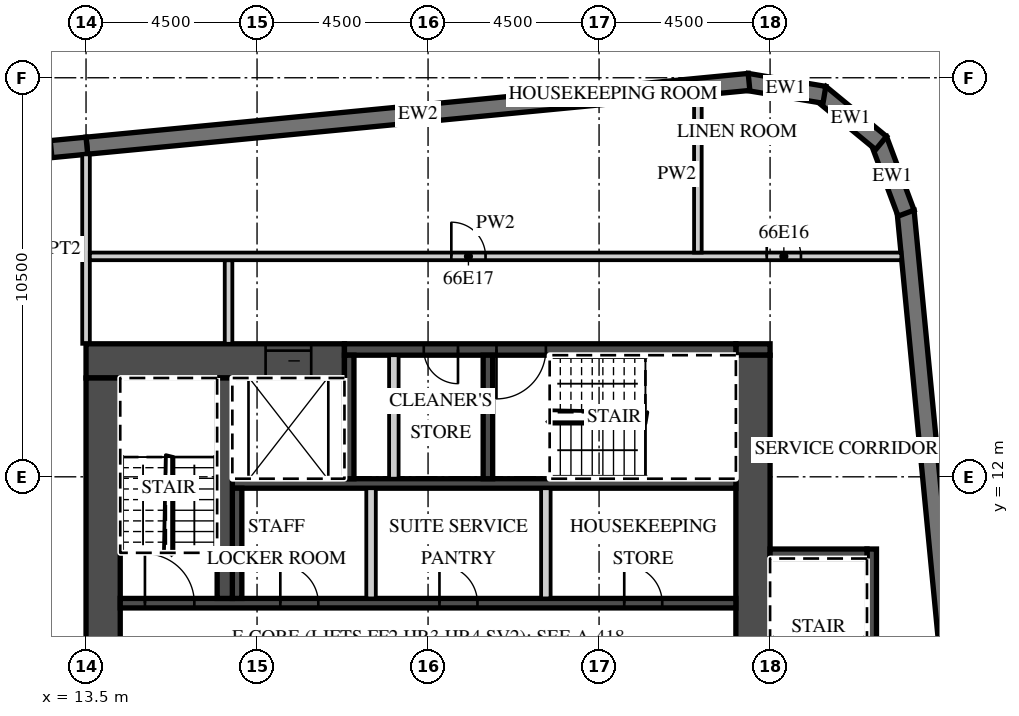
"""IFC4 building model, lengths in metres.
Left out: names, types, materials, properties, quantities, classifications, styles, units other than length and angle.
Written with IfcOpenShell. Run it as: python <this file> out.ifc"""

import sys

from ifc_helpers import new_model, si_unit, direction, frame, frame_2d, origin, place, context, subcontext, project, spatial, polyline, rectangle, outline, extrude, element, fill, save


model = new_model("IFC4")
c1 = context("Model", 3, precision=1e-05, world=origin(), true_north=direction((0.0, 1.0)))
c2 = subcontext(c1, "Body", "Model", "MODEL_VIEW")
j1 = project(units=[si_unit("LENGTHUNIT", "METRE"), si_unit("PLANEANGLEUNIT", "RADIAN")], contexts=[c1])
p1 = place(None, origin())
s1 = spatial("IfcSite", under=j1, at=p1, CompositionType="ELEMENT")
p2 = place(p1, origin())
s2 = spatial("IfcBuilding", under=s1, at=p2, CompositionType="ELEMENT")
p3 = place(p2, frame((0.0, 0.0, 268.5)))
s3 = spatial("IfcBuildingStorey", under=s2, at=p3, CompositionType="ELEMENT", Elevation=268.5)
p4 = place(p3, frame((38.132, -12.858, 0.0), z_axis=(0.0, 0.0, 1.0), x_axis=(-0.095847749461, 0.995396006082, 0.0)))
e1 = element("IfcWall", 1, at=p4, inside=s3, PredefinedType="SOLIDWALL", context=c2, shape_type="SweptSolid", body=[
    extrude(rectangle(XDim=32.0, YDim=0.45, at=frame_2d((16.0, 0.0))), origin(), (0.0, 0.0, 1.0), 3.02),
])
p5 = place(p3, frame((35.078, 18.938, 0.0), z_axis=(0.0, 0.0, 1.0), x_axis=(-0.350192909346, 0.936677599948, 0.0)))
e2 = element("IfcWall", 2, at=p5, inside=s3, PredefinedType="SOLIDWALL", context=c2, shape_type="SweptSolid", body=[
    extrude(outline(polyline([(0.0, -0.225), (2.071, -0.225), (1.95, 0.225), (0.121, 0.225), (0.0, -0.225)])), origin(), (0.0, 0.0, 1.0), 3.02),
])
p6 = place(p3, frame((34.421, 20.782, 0.0), z_axis=(0.0, 0.0, 1.0), x_axis=(-0.771593176315, 0.636116318187, 0.0)))
e3 = element("IfcWall", 3, at=p6, inside=s3, PredefinedType="SOLIDWALL", context=c2, shape_type="SweptSolid", body=[
    extrude(outline(polyline([(0.0, -0.225), (2.071, -0.225), (1.95, 0.225), (0.12, 0.225), (0.0, -0.225)])), origin(), (0.0, 0.0, 1.0), 3.02),
])
p7 = place(p3, frame((32.929, 22.051, 0.0), z_axis=(0.0, 0.0, 1.0), x_axis=(-0.986298144721, 0.164972633245, 0.0)))
e4 = element("IfcWall", 4, at=p7, inside=s3, PredefinedType="SOLIDWALL", context=c2, shape_type="SweptSolid", body=[
    extrude(outline(polyline([(0.0, -0.225), (2.07, -0.225), (1.95, 0.225), (0.121, 0.225), (0.0, -0.225)])), origin(), (0.0, 0.0, 1.0), 3.02),
])
p8 = place(p3, frame((30.946, 22.391, 0.0), z_axis=(0.0, 0.0, 1.0), x_axis=(-0.995396397117, -0.095843688398, 0.0)))
e5 = element("IfcWall", 5, at=p8, inside=s3, PredefinedType="SOLIDWALL", context=c2, shape_type="SweptSolid", body=[
    extrude(rectangle(XDim=17.505, YDim=0.45, at=frame_2d((8.752, 0.0))), origin(), (0.0, 0.0, 1.0), 3.02),
])
p9 = place(p3, frame((13.521, 20.713, 0.0), z_axis=(0.0, 0.0, 1.0), x_axis=(-0.995396277313, -0.095844932638, 0.0)))
e6 = element("IfcWall", 6, at=p9, inside=s3, PredefinedType="SOLIDWALL", context=c2, shape_type="SweptSolid", body=[
    extrude(rectangle(XDim=51.495, YDim=0.45, at=frame_2d((25.748, 0.0))), origin(), (0.0, 0.0, 1.0), 3.02),
])
p10 = place(p9, frame((0.91, 0.0, 0.45)))
e7 = element("IfcOpeningElement", 7, at=p10, cuts=e6, PredefinedType="OPENING", context=c2, shape_type="SweptSolid", body=[
    extrude(rectangle(XDim=2.7, YDim=2.25, at=frame_2d((1.35, 1.125))), frame((0.0, 0.235, 0.0), z_axis=(0.0, -1.0, 0.0), x_axis=(1.0, 0.0, 0.0)), (0.0, 0.0, 1.0), 0.47),
])
p11 = place(p9, frame((5.431, 0.0, 0.45)))
e8 = element("IfcOpeningElement", 8, at=p11, cuts=e6, PredefinedType="OPENING", context=c2, shape_type="SweptSolid", body=[
    extrude(rectangle(XDim=2.7, YDim=2.25, at=frame_2d((1.35, 1.125))), frame((0.0, 0.235, 0.0), z_axis=(0.0, -1.0, 0.0), x_axis=(1.0, 0.0, 0.0)), (0.0, 0.0, 1.0), 0.47),
])
p12 = place(p9, frame((9.952, 0.0, 0.45)))
e9 = element("IfcOpeningElement", 9, at=p12, cuts=e6, PredefinedType="OPENING", context=c2, shape_type="SweptSolid", body=[
    extrude(rectangle(XDim=2.7, YDim=2.25, at=frame_2d((1.35, 1.125))), frame((0.0, 0.235, 0.0), z_axis=(0.0, -1.0, 0.0), x_axis=(1.0, 0.0, 0.0)), (0.0, 0.0, 1.0), 0.47),
])
p13 = place(p9, frame((14.473, 0.0, 0.45)))
e10 = element("IfcOpeningElement", 10, at=p13, cuts=e6, PredefinedType="OPENING", context=c2, shape_type="SweptSolid", body=[
    extrude(rectangle(XDim=2.7, YDim=2.25, at=frame_2d((1.35, 1.125))), frame((0.0, 0.235, 0.0), z_axis=(0.0, -1.0, 0.0), x_axis=(1.0, 0.0, 0.0)), (0.0, 0.0, 1.0), 0.47),
])
p14 = place(p9, frame((18.994, 0.0, 0.45)))
e11 = element("IfcOpeningElement", 11, at=p14, cuts=e6, PredefinedType="OPENING", context=c2, shape_type="SweptSolid", body=[
    extrude(rectangle(XDim=2.7, YDim=2.25, at=frame_2d((1.35, 1.125))), frame((0.0, 0.235, 0.0), z_axis=(0.0, -1.0, 0.0), x_axis=(1.0, 0.0, 0.0)), (0.0, 0.0, 1.0), 0.47),
])
p15 = place(p9, frame((23.514, 0.0, 0.45)))
e12 = element("IfcOpeningElement", 12, at=p15, cuts=e6, PredefinedType="OPENING", context=c2, shape_type="SweptSolid", body=[
    extrude(rectangle(XDim=2.7, YDim=2.25, at=frame_2d((1.35, 1.125))), frame((0.0, 0.235, 0.0), z_axis=(0.0, -1.0, 0.0), x_axis=(1.0, 0.0, 0.0)), (0.0, 0.0, 1.0), 0.47),
])
p16 = place(p9, frame((28.035, 0.0, 0.45)))
e13 = element("IfcOpeningElement", 13, at=p16, cuts=e6, PredefinedType="OPENING", context=c2, shape_type="SweptSolid", body=[
    extrude(rectangle(XDim=2.7, YDim=2.25, at=frame_2d((1.35, 1.125))), frame((0.0, 0.235, 0.0), z_axis=(0.0, -1.0, 0.0), x_axis=(1.0, 0.0, 0.0)), (0.0, 0.0, 1.0), 0.47),
])
p17 = place(p9, frame((32.556, 0.0, 0.45)))
e14 = element("IfcOpeningElement", 14, at=p17, cuts=e6, PredefinedType="OPENING", context=c2, shape_type="SweptSolid", body=[
    extrude(rectangle(XDim=2.7, YDim=2.25, at=frame_2d((1.35, 1.125))), frame((0.0, 0.235, 0.0), z_axis=(0.0, -1.0, 0.0), x_axis=(1.0, 0.0, 0.0)), (0.0, 0.0, 1.0), 0.47),
])
p18 = place(p9, frame((37.077, 0.0, 0.45)))
e15 = element("IfcOpeningElement", 15, at=p18, cuts=e6, PredefinedType="OPENING", context=c2, shape_type="SweptSolid", body=[
    extrude(rectangle(XDim=2.7, YDim=2.25, at=frame_2d((1.35, 1.125))), frame((0.0, 0.235, 0.0), z_axis=(0.0, -1.0, 0.0), x_axis=(1.0, 0.0, 0.0)), (0.0, 0.0, 1.0), 0.47),
])
p19 = place(p9, frame((41.598, 0.0, 0.45)))
e16 = element("IfcOpeningElement", 16, at=p19, cuts=e6, PredefinedType="OPENING", context=c2, shape_type="SweptSolid", body=[
    extrude(rectangle(XDim=2.7, YDim=2.25, at=frame_2d((1.35, 1.125))), frame((0.0, 0.235, 0.0), z_axis=(0.0, -1.0, 0.0), x_axis=(1.0, 0.0, 0.0)), (0.0, 0.0, 1.0), 0.47),
])
p20 = place(p9, frame((46.118, 0.0, 0.45)))
e17 = element("IfcOpeningElement", 17, at=p20, cuts=e6, PredefinedType="OPENING", context=c2, shape_type="SweptSolid", body=[
    extrude(rectangle(XDim=2.7, YDim=2.25, at=frame_2d((1.35, 1.125))), frame((0.0, 0.235, 0.0), z_axis=(0.0, -1.0, 0.0), x_axis=(1.0, 0.0, 0.0)), (0.0, 0.0, 1.0), 0.47),
])
p21 = place(p3, frame((13.5, 15.5, 0.0), z_axis=(0.0, 0.0, 1.0), x_axis=(0.0, 1.0, 0.0)))
e18 = element("IfcWall", 18, at=p21, inside=s3, PredefinedType="PARTITIONING", context=c2, shape_type="SweptSolid", body=[
    extrude(rectangle(XDim=4.985, YDim=0.2, at=frame_2d((2.493, 0.0))), origin(), (0.0, 0.0, 1.0), 3.02),
])
p22 = place(p3, frame((13.5, 15.05, 0.0), z_axis=(0.0, 0.0, 1.0), x_axis=(1.0, 0.0, 0.0)))
e19 = element("IfcWall", 19, at=p22, inside=s3, PredefinedType="SHEAR", context=c2, shape_type="SweptSolid", body=[
    extrude(rectangle(XDim=6.8, YDim=0.9, at=frame_2d((3.4, 0.0))), origin(), (0.0, 0.0, 1.0), 3.02),
])
p23 = place(p22, frame((4.725, 0.0, 0.0)))
e20 = element("IfcOpeningElement", 20, at=p23, cuts=e19, PredefinedType="OPENING", context=c2, shape_type="SweptSolid", body=[
    extrude(rectangle(XDim=1.2, YDim=2.1, at=frame_2d((0.6, 1.05))), frame((0.0, 0.46, 0.0), z_axis=(0.0, -1.0, 0.0), x_axis=(1.0, 0.0, 0.0)), (0.0, 0.0, 1.0), 0.92),
])
p24 = place(p3, frame((30.6, 15.35, 0.0), z_axis=(0.0, 0.0, 1.0), x_axis=(1.0, 0.0, 0.0)))
e21 = element("IfcWall", 21, at=p24, inside=s3, PredefinedType="SHEAR", context=c2, shape_type="SweptSolid", body=[
    extrude(rectangle(XDim=0.9, YDim=0.3, at=frame_2d((0.45, 0.0))), origin(), (0.0, 0.0, 1.0), 3.02),
])
p25 = place(p3, frame((20.3, 15.35, 0.0), z_axis=(0.0, 0.0, 1.0), x_axis=(1.0, 0.0, 0.0)))
e22 = element("IfcWall", 22, at=p25, inside=s3, PredefinedType="SHEAR", context=c2, shape_type="SweptSolid", body=[
    extrude(rectangle(XDim=10.3, YDim=0.3, at=frame_2d((5.15, 0.0))), origin(), (0.0, 0.0, 1.0), 3.02),
])
p26 = place(p25, frame((4.0, 0.0, 0.0)))
e23 = element("IfcOpeningElement", 23, at=p26, cuts=e22, PredefinedType="OPENING", context=c2, shape_type="SweptSolid", body=[
    extrude(rectangle(XDim=1.3, YDim=2.1, at=frame_2d((0.65, 1.05))), frame((0.0, 0.16, 0.0), z_axis=(0.0, -1.0, 0.0), x_axis=(1.0, 0.0, 0.0)), (0.0, 0.0, 1.0), 0.32),
])
p27 = place(p25, frame((2.087, 0.0, 0.0)))
e24 = element("IfcOpeningElement", 24, at=p27, cuts=e22, PredefinedType="OPENING", context=c2, shape_type="SweptSolid", body=[
    extrude(rectangle(XDim=0.9, YDim=2.1, at=frame_2d((0.45, 1.05))), frame((0.0, 0.16, 0.0), z_axis=(0.0, -1.0, 0.0), x_axis=(1.0, 0.0, 0.0)), (0.0, 0.0, 1.0), 0.32),
])
p28 = place(p3, frame((31.05, 2.4, 0.0), z_axis=(0.0, 0.0, 1.0), x_axis=(0.0, 1.0, 0.0)))
e25 = element("IfcWall", 25, at=p28, inside=s3, PredefinedType="SHEAR", context=c2, shape_type="SweptSolid", body=[
    extrude(rectangle(XDim=12.8, YDim=0.9, at=frame_2d((6.4, 0.0))), origin(), (0.0, 0.0, 1.0), 3.02),
])
p29 = place(p28, frame((0.2, 0.0, 0.0)))
e26 = element("IfcOpeningElement", 26, at=p29, cuts=e25, PredefinedType="OPENING", context=c2, shape_type="SweptSolid", body=[
    extrude(rectangle(XDim=1.1, YDim=2.1, at=frame_2d((0.55, 1.05))), frame((0.0, 0.46, 0.0), z_axis=(0.0, -1.0, 0.0), x_axis=(1.0, 0.0, 0.0)), (0.0, 0.0, 1.0), 0.92),
])
p30 = place(p3, frame((13.95, 2.4, 0.0), z_axis=(0.0, 0.0, 1.0), x_axis=(0.0, 1.0, 0.0)))
e27 = element("IfcWall", 27, at=p30, inside=s3, PredefinedType="SHEAR", context=c2, shape_type="SweptSolid", body=[
    extrude(rectangle(XDim=12.2, YDim=0.9, at=frame_2d((6.1, 0.0))), origin(), (0.0, 0.0, 1.0), 3.02),
])
p31 = place(p3, frame((14.4, 8.675, 0.0), z_axis=(0.0, 0.0, 1.0), x_axis=(1.0, 0.0, 0.0)))
e28 = element("IfcWall", 28, at=p31, inside=s3, PredefinedType="SHEAR", context=c2, shape_type="SweptSolid", body=[
    extrude(rectangle(XDim=16.2, YDim=0.25, at=frame_2d((8.1, 0.0))), origin(), (0.0, 0.0, 1.0), 3.02),
])
p32 = place(p31, frame((0.65, 0.0, 0.0)))
e29 = element("IfcOpeningElement", 29, at=p32, cuts=e28, PredefinedType="OPENING", context=c2, shape_type="SweptSolid", body=[
    extrude(rectangle(XDim=1.3, YDim=2.1, at=frame_2d((0.65, 1.05))), frame((0.0, 0.135, 0.0), z_axis=(0.0, -1.0, 0.0), x_axis=(1.0, 0.0, 0.0)), (0.0, 0.0, 1.0), 0.27),
])
p33 = place(p31, frame((13.262, 0.0, 0.0)))
e30 = element("IfcOpeningElement", 30, at=p33, cuts=e28, PredefinedType="OPENING", context=c2, shape_type="SweptSolid", body=[
    extrude(rectangle(XDim=1.0, YDim=2.1, at=frame_2d((0.5, 1.05))), frame((0.0, 0.135, 0.0), z_axis=(0.0, -1.0, 0.0), x_axis=(1.0, 0.0, 0.0)), (0.0, 0.0, 1.0), 0.27),
])
p34 = place(p31, frame((8.4, 0.0, 0.0)))
e31 = element("IfcOpeningElement", 31, at=p34, cuts=e28, PredefinedType="OPENING", context=c2, shape_type="SweptSolid", body=[
    extrude(rectangle(XDim=1.0, YDim=2.1, at=frame_2d((0.5, 1.05))), frame((0.0, 0.135, 0.0), z_axis=(0.0, -1.0, 0.0), x_axis=(1.0, 0.0, 0.0)), (0.0, 0.0, 1.0), 0.27),
])
p35 = place(p31, frame((4.212, 0.0, 0.0)))
e32 = element("IfcOpeningElement", 32, at=p35, cuts=e28, PredefinedType="OPENING", context=c2, shape_type="SweptSolid", body=[
    extrude(rectangle(XDim=1.0, YDim=2.1, at=frame_2d((0.5, 1.05))), frame((0.0, 0.135, 0.0), z_axis=(0.0, -1.0, 0.0), x_axis=(1.0, 0.0, 0.0)), (0.0, 0.0, 1.0), 0.27),
])
p36 = place(p3, frame((17.35, 11.825, 0.0), z_axis=(0.0, 0.0, 1.0), x_axis=(1.0, 0.0, 0.0)))
e33 = element("IfcWall", 33, at=p36, inside=s3, PredefinedType="SHEAR", context=c2, shape_type="SweptSolid", body=[
    extrude(rectangle(XDim=13.25, YDim=0.25, at=frame_2d((6.625, 0.0))), origin(), (0.0, 0.0, 1.0), 3.02),
])
p37 = place(p3, frame((17.475, 8.8, 0.0), z_axis=(0.0, 0.0, 1.0), x_axis=(0.0, 1.0, 0.0)))
e34 = element("IfcWall", 34, at=p37, inside=s3, PredefinedType="SHEAR", context=c2, shape_type="SweptSolid", body=[
    extrude(rectangle(XDim=2.9, YDim=0.25, at=frame_2d((1.45, 0.0))), origin(), (0.0, 0.0, 1.0), 3.02),
])
for number, where, z_axis, x_axis in (
    (35, (25.6, 8.8, 0.0), (0.0, 0.0, 1.0), (0.0, 1.0, 0.0)),
    (36, (21.0, 8.8, 0.0), (0.0, 0.0, 1.0), (0.0, 1.0, 0.0)),
):
    element("IfcWall", number, at=place(p3, frame(where, z_axis=z_axis, x_axis=x_axis)), inside=s3, PredefinedType="PARTITIONING", context=c2, shape_type="SweptSolid", body=[
        extrude(rectangle(XDim=2.9, YDim=0.25, at=frame_2d((1.45, 0.0))), origin(), (0.0, 0.0, 1.0), 3.02),
    ])
p38 = place(p3, frame((17.15, 8.8, 0.0), z_axis=(0.0, 0.0, 1.0), x_axis=(0.0, 1.0, 0.0)))
e37 = element("IfcWall", 37, at=p38, inside=s3, PredefinedType="SHEAR", context=c2, shape_type="SweptSolid", body=[
    extrude(rectangle(XDim=5.8, YDim=0.4, at=frame_2d((2.9, 0.0))), origin(), (0.0, 0.0, 1.0), 3.02),
])
for number, where, z_axis, x_axis in (
    (38, (20.425, 11.95, 0.0), (0.0, 0.0, 1.0), (0.0, 1.0, 0.0)),
    (39, (24.075, 11.95, 0.0), (0.0, 0.0, 1.0), (0.0, 1.0, 0.0)),
):
    element("IfcWall", number, at=place(p3, frame(where, z_axis=z_axis, x_axis=x_axis)), inside=s3, PredefinedType="SHEAR", context=c2, shape_type="SweptSolid", body=[
        extrude(rectangle(XDim=3.25, YDim=0.25, at=frame_2d((1.625, 0.0))), origin(), (0.0, 0.0, 1.0), 3.02),
    ])
p39 = place(p3, frame((21.6, 11.95, 0.0), z_axis=(0.0, 0.0, 1.0), x_axis=(0.0, 1.0, 0.0)))
e40 = element("IfcWall", 40, at=p39, inside=s3, PredefinedType="PARTITIONING", context=c2, shape_type="SweptSolid", body=[
    extrude(rectangle(XDim=3.25, YDim=0.25, at=frame_2d((1.625, 0.0))), origin(), (0.0, 0.0, 1.0), 3.02),
])
p40 = place(p3, frame((34.175, 1.75, 0.0), z_axis=(0.0, 0.0, 1.0), x_axis=(0.0, 1.0, 0.0)))
e41 = element("IfcWall", 41, at=p40, inside=s3, PredefinedType="SHEAR", context=c2, shape_type="SweptSolid", body=[
    extrude(rectangle(XDim=8.35, YDim=0.25, at=frame_2d((4.175, 0.0))), origin(), (0.0, 0.0, 1.0), 3.02),
])
p41 = place(p3, frame((31.5, 9.975, 0.0), z_axis=(0.0, 0.0, 1.0), x_axis=(1.0, 0.0, 0.0)))
e42 = element("IfcWall", 42, at=p41, inside=s3, PredefinedType="SHEAR", context=c2, shape_type="SweptSolid", body=[
    extrude(rectangle(XDim=2.55, YDim=0.25, at=frame_2d((1.275, 0.0))), origin(), (0.0, 0.0, 1.0), 3.02),
])
p42 = place(p3, frame((17.25, 15.5, 0.0), z_axis=(0.0, 0.0, 1.0), x_axis=(0.0, 1.0, 0.0)))
e43 = element("IfcWall", 43, at=p42, inside=s3, PredefinedType="PARTITIONING", context=c2, shape_type="SweptSolid", body=[
    extrude(rectangle(XDim=2.2, YDim=0.2, at=frame_2d((1.1, 0.0))), origin(), (0.0, 0.0, 1.0), 3.02),
])
p43 = place(p3, frame((13.6, 17.8, 0.0), z_axis=(0.0, 0.0, 1.0), x_axis=(1.0, 0.0, 0.0)))
e44 = element("IfcWall", 44, at=p43, inside=s3, PredefinedType="PARTITIONING", context=c2, shape_type="SweptSolid", body=[
    extrude(rectangle(XDim=21.354, YDim=0.2, at=frame_2d((10.677, 0.0))), origin(), (0.0, 0.0, 1.0), 3.02),
])
p44 = place(p43, frame((17.812, 0.0, 0.0)))
e45 = element("IfcOpeningElement", 45, at=p44, cuts=e44, PredefinedType="OPENING", context=c2, shape_type="SweptSolid", body=[
    extrude(rectangle(XDim=0.9, YDim=2.1, at=frame_2d((0.45, 1.05))), frame((0.0, 0.11, 0.0), z_axis=(0.0, -1.0, 0.0), x_axis=(1.0, 0.0, 0.0)), (0.0, 0.0, 1.0), 0.22),
])
p45 = place(p43, frame((9.512, 0.0, 0.0)))
e46 = element("IfcOpeningElement", 46, at=p45, cuts=e44, PredefinedType="OPENING", context=c2, shape_type="SweptSolid", body=[
    extrude(rectangle(XDim=0.9, YDim=2.1, at=frame_2d((0.45, 1.05))), frame((0.0, 0.11, 0.0), z_axis=(0.0, -1.0, 0.0), x_axis=(1.0, 0.0, 0.0)), (0.0, 0.0, 1.0), 0.22),
])
p46 = place(p3, frame((29.6, 17.9, 0.0), z_axis=(0.0, 0.0, 1.0), x_axis=(0.0, 1.0, 0.0)))
e47 = element("IfcWall", 47, at=p46, inside=s3, PredefinedType="PARTITIONING", context=c2, shape_type="SweptSolid", body=[
    extrude(rectangle(XDim=4.136, YDim=0.2, at=frame_2d((2.068, 0.0))), origin(), (0.0, 0.0, 1.0), 3.02),
])
p47 = place(p10, origin())
e48 = element("IfcWindow", 48, at=p47, inside=s3, PartitioningType="SINGLE_PANEL", PredefinedType="WINDOW", context=c2, shape_type="SweptSolid", body=[
    extrude(rectangle(XDim=2.7, YDim=2.25, at=frame_2d((1.35, 1.125))), frame((0.0, 0.09, 0.0), z_axis=(0.0, -1.0, 0.0), x_axis=(1.0, 0.0, 0.0)), (0.0, 0.0, 1.0), 0.06),
])
fill(e7, e48)
p48 = place(p23, origin())
e49 = element("IfcDoor", 49, at=p48, inside=s3, OperationType="SLIDING_TO_LEFT", PredefinedType="DOOR", context=c2, shape_type="SweptSolid", body=[
    extrude(rectangle(XDim=1.2, YDim=2.1, at=frame_2d((0.6, 1.05))), frame((0.0, 0.025, 0.0), z_axis=(0.0, -1.0, 0.0), x_axis=(1.0, 0.0, 0.0)), (0.0, 0.0, 1.0), 0.05),
])
fill(e20, e49)
p49 = place(p32, origin())
e50 = element("IfcDoor", 50, at=p49, inside=s3, OperationType="SINGLE_SWING_LEFT", PredefinedType="DOOR", context=c2, shape_type="SweptSolid", body=[
    extrude(rectangle(XDim=1.3, YDim=2.1, at=frame_2d((0.65, 1.05))), frame((0.0, 0.025, 0.0), z_axis=(0.0, -1.0, 0.0), x_axis=(1.0, 0.0, 0.0)), (0.0, 0.0, 1.0), 0.05),
])
fill(e29, e50)
p50 = place(p26, origin())
e51 = element("IfcDoor", 51, at=p50, inside=s3, OperationType="SINGLE_SWING_LEFT", PredefinedType="DOOR", context=c2, shape_type="SweptSolid", body=[
    extrude(rectangle(XDim=1.3, YDim=2.1, at=frame_2d((0.65, 1.05))), frame((0.0, 0.025, 0.0), z_axis=(0.0, -1.0, 0.0), x_axis=(1.0, 0.0, 0.0)), (0.0, 0.0, 1.0), 0.05),
])
fill(e23, e51)
p51 = place(p27, origin())
e52 = element("IfcDoor", 52, at=p51, inside=s3, OperationType="SINGLE_SWING_RIGHT", PredefinedType="DOOR", context=c2, shape_type="SweptSolid", body=[
    extrude(rectangle(XDim=0.9, YDim=2.1, at=frame_2d((0.45, 1.05))), frame((0.0, 0.025, 0.0), z_axis=(0.0, -1.0, 0.0), x_axis=(1.0, 0.0, 0.0)), (0.0, 0.0, 1.0), 0.05),
])
fill(e24, e52)
p52 = place(p33, origin())
e53 = element("IfcDoor", 53, at=p52, inside=s3, OperationType="SINGLE_SWING_LEFT", PredefinedType="DOOR", context=c2, shape_type="SweptSolid", body=[
    extrude(rectangle(XDim=1.0, YDim=2.1, at=frame_2d((0.5, 1.05))), frame((0.0, 0.025, 0.0), z_axis=(0.0, -1.0, 0.0), x_axis=(1.0, 0.0, 0.0)), (0.0, 0.0, 1.0), 0.05),
])
fill(e30, e53)
p53 = place(p34, origin())
e54 = element("IfcDoor", 54, at=p53, inside=s3, OperationType="SINGLE_SWING_LEFT", PredefinedType="DOOR", context=c2, shape_type="SweptSolid", body=[
    extrude(rectangle(XDim=1.0, YDim=2.1, at=frame_2d((0.5, 1.05))), frame((0.0, 0.025, 0.0), z_axis=(0.0, -1.0, 0.0), x_axis=(1.0, 0.0, 0.0)), (0.0, 0.0, 1.0), 0.05),
])
fill(e31, e54)
p54 = place(p35, origin())
e55 = element("IfcDoor", 55, at=p54, inside=s3, OperationType="SINGLE_SWING_LEFT", PredefinedType="DOOR", context=c2, shape_type="SweptSolid", body=[
    extrude(rectangle(XDim=1.0, YDim=2.1, at=frame_2d((0.5, 1.05))), frame((0.0, 0.025, 0.0), z_axis=(0.0, -1.0, 0.0), x_axis=(1.0, 0.0, 0.0)), (0.0, 0.0, 1.0), 0.05),
])
fill(e32, e55)
p55 = place(p44, origin())
e56 = element("IfcDoor", 56, at=p55, inside=s3, OperationType="SINGLE_SWING_LEFT", PredefinedType="DOOR", context=c2, shape_type="SweptSolid", body=[
    extrude(rectangle(XDim=0.9, YDim=2.1, at=frame_2d((0.45, 1.05))), frame((0.0, 0.025, 0.0), z_axis=(0.0, -1.0, 0.0), x_axis=(1.0, 0.0, 0.0)), (0.0, 0.0, 1.0), 0.05),
])
fill(e45, e56)
p56 = place(p45, origin())
e57 = element("IfcDoor", 57, at=p56, inside=s3, OperationType="SINGLE_SWING_LEFT", PredefinedType="DOOR", context=c2, shape_type="SweptSolid", body=[
    extrude(rectangle(XDim=0.9, YDim=2.1, at=frame_2d((0.45, 1.05))), frame((0.0, 0.025, 0.0), z_axis=(0.0, -1.0, 0.0), x_axis=(1.0, 0.0, 0.0)), (0.0, 0.0, 1.0), 0.05),
])
fill(e46, e57)
save(model, sys.argv[1])
